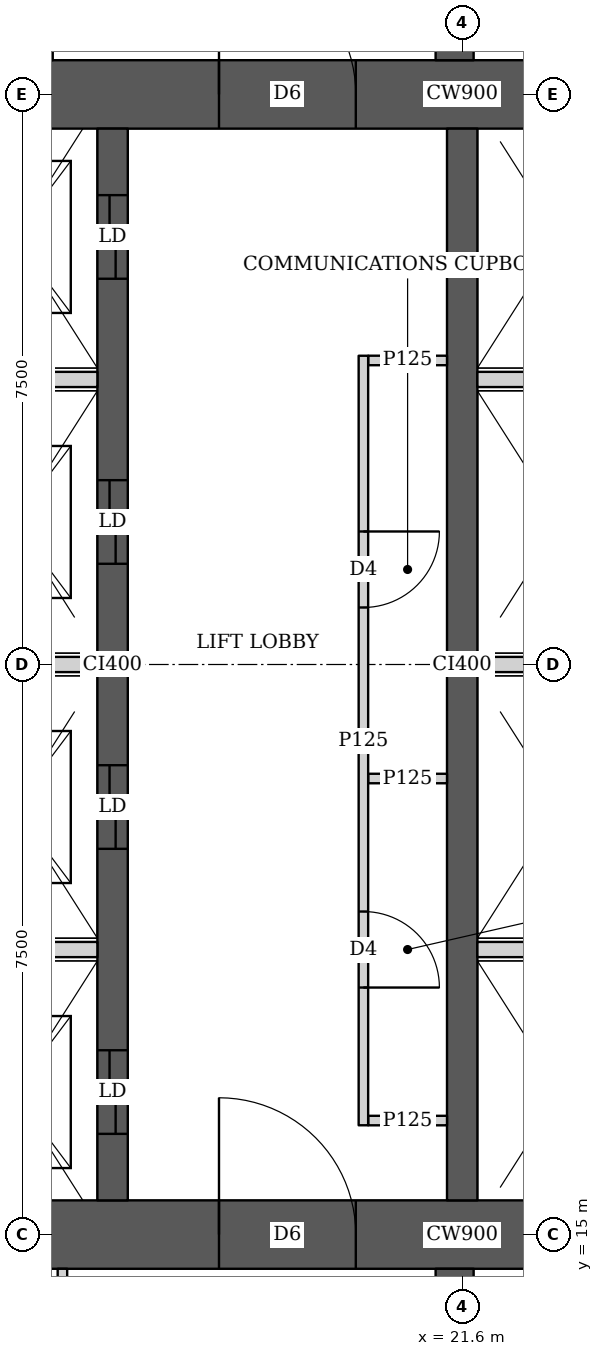
"""IFC4 building model, lengths in metres.
Left out: names, types, materials, properties, quantities, classifications, styles, units other than length and angle.
Written with IfcOpenShell. Run it as: python <this file> out.ifc"""

import sys

from ifc_helpers import new_model, si_unit, direction, frame, frame_2d, origin, place, context, subcontext, project, spatial, rectangle, extrude, element, fill, save


model = new_model("IFC4")
c1 = context("Model", 3, precision=1e-05, world=origin(), true_north=direction((0.0, 1.0)))
c2 = subcontext(c1, "Body", "Model", "MODEL_VIEW")
j1 = project(units=[si_unit("LENGTHUNIT", "METRE"), si_unit("PLANEANGLEUNIT", "RADIAN")], contexts=[c1])
p1 = place(None, origin())
s1 = spatial("IfcSite", under=j1, at=p1, CompositionType="ELEMENT")
p2 = place(p1, origin())
s2 = spatial("IfcBuilding", under=s1, at=p2, CompositionType="ELEMENT")
p3 = place(p2, frame((0.0, 0.0, 65.0)))
s3 = spatial("IfcBuildingStorey", under=s2, at=p3, CompositionType="ELEMENT", Elevation=65.0)
p4 = place(p3, frame((13.95, 15.0, 0.0), z_axis=(0.0, 0.0, 1.0), x_axis=(1.0, 0.0, 0.0)))
e1 = element("IfcWall", 1, at=p4, inside=s3, PredefinedType="SHEAR", context=c2, shape_type="SweptSolid", body=[
    extrude(rectangle(XDim=15.3, YDim=0.9, at=frame_2d((7.65, 0.0))), origin(), (0.0, 0.0, 1.0), 3.75),
])
p5 = place(p4, frame((4.45, 0.0, 0.0)))
e2 = element("IfcOpeningElement", 2, at=p5, cuts=e1, PredefinedType="OPENING", context=c2, shape_type="SweptSolid", body=[
    extrude(rectangle(XDim=1.8, YDim=2.1, at=frame_2d((0.9, 1.05))), frame((0.0, 0.46, 0.0), z_axis=(0.0, -1.0, 0.0), x_axis=(1.0, 0.0, 0.0)), (0.0, 0.0, 1.0), 0.92),
])
p6 = place(p4, frame((10.7, 0.0, 0.0)))
e3 = element("IfcOpeningElement", 3, at=p6, cuts=e1, PredefinedType="OPENING", context=c2, shape_type="SweptSolid", body=[
    extrude(rectangle(XDim=1.1, YDim=2.1, at=frame_2d((0.55, 1.05))), frame((0.0, 0.46, 0.0), z_axis=(0.0, -1.0, 0.0), x_axis=(1.0, 0.0, 0.0)), (0.0, 0.0, 1.0), 0.92),
])
p7 = place(p3, frame((13.95, 30.0, 0.0), z_axis=(0.0, 0.0, 1.0), x_axis=(1.0, 0.0, 0.0)))
e4 = element("IfcWall", 4, at=p7, inside=s3, PredefinedType="SHEAR", context=c2, shape_type="SweptSolid", body=[
    extrude(rectangle(XDim=15.3, YDim=0.9, at=frame_2d((7.65, 0.0))), origin(), (0.0, 0.0, 1.0), 3.75),
])
p8 = place(p7, frame((4.45, 0.0, 0.0)))
e5 = element("IfcOpeningElement", 5, at=p8, cuts=e4, PredefinedType="OPENING", context=c2, shape_type="SweptSolid", body=[
    extrude(rectangle(XDim=1.8, YDim=2.1, at=frame_2d((0.9, 1.05))), frame((0.0, 0.46, 0.0), z_axis=(0.0, -1.0, 0.0), x_axis=(1.0, 0.0, 0.0)), (0.0, 0.0, 1.0), 0.92),
])
p9 = place(p7, frame((10.7, 0.0, 0.0)))
e6 = element("IfcOpeningElement", 6, at=p9, cuts=e4, PredefinedType="OPENING", context=c2, shape_type="SweptSolid", body=[
    extrude(rectangle(XDim=1.1, YDim=2.1, at=frame_2d((0.55, 1.05))), frame((0.0, 0.46, 0.0), z_axis=(0.0, -1.0, 0.0), x_axis=(1.0, 0.0, 0.0)), (0.0, 0.0, 1.0), 0.92),
])
p10 = place(p3, frame((17.0, 15.45, 0.0), z_axis=(0.0, 0.0, 1.0), x_axis=(0.0, 1.0, 0.0)))
e7 = element("IfcWall", 7, at=p10, inside=s3, PredefinedType="SHEAR", context=c2, shape_type="SweptSolid", body=[
    extrude(rectangle(XDim=14.1, YDim=0.4, at=frame_2d((7.05, 0.0))), origin(), (0.0, 0.0, 1.0), 3.75),
])
p11 = place(p10, frame((0.875, 0.0, 0.0)))
e8 = element("IfcOpeningElement", 8, at=p11, cuts=e7, PredefinedType="OPENING", context=c2, shape_type="SweptSolid", body=[
    extrude(rectangle(XDim=1.1, YDim=2.1, at=frame_2d((0.55, 1.05))), frame((0.0, 0.21, 0.0), z_axis=(0.0, -1.0, 0.0), x_axis=(1.0, 0.0, 0.0)), (0.0, 0.0, 1.0), 0.42),
])
p12 = place(p10, frame((4.625, 0.0, 0.0)))
e9 = element("IfcOpeningElement", 9, at=p12, cuts=e7, PredefinedType="OPENING", context=c2, shape_type="SweptSolid", body=[
    extrude(rectangle(XDim=1.1, YDim=2.1, at=frame_2d((0.55, 1.05))), frame((0.0, 0.21, 0.0), z_axis=(0.0, -1.0, 0.0), x_axis=(1.0, 0.0, 0.0)), (0.0, 0.0, 1.0), 0.42),
])
p13 = place(p10, frame((8.375, 0.0, 0.0)))
e10 = element("IfcOpeningElement", 10, at=p13, cuts=e7, PredefinedType="OPENING", context=c2, shape_type="SweptSolid", body=[
    extrude(rectangle(XDim=1.1, YDim=2.1, at=frame_2d((0.55, 1.05))), frame((0.0, 0.21, 0.0), z_axis=(0.0, -1.0, 0.0), x_axis=(1.0, 0.0, 0.0)), (0.0, 0.0, 1.0), 0.42),
])
p14 = place(p10, frame((12.125, 0.0, 0.0)))
e11 = element("IfcOpeningElement", 11, at=p14, cuts=e7, PredefinedType="OPENING", context=c2, shape_type="SweptSolid", body=[
    extrude(rectangle(XDim=1.1, YDim=2.1, at=frame_2d((0.55, 1.05))), frame((0.0, 0.21, 0.0), z_axis=(0.0, -1.0, 0.0), x_axis=(1.0, 0.0, 0.0)), (0.0, 0.0, 1.0), 0.42),
])
p15 = place(p3, frame((21.6, 15.45, 0.0), z_axis=(0.0, 0.0, 1.0), x_axis=(0.0, 1.0, 0.0)))
e12 = element("IfcWall", 12, at=p15, inside=s3, PredefinedType="SHEAR", context=c2, shape_type="SweptSolid", body=[
    extrude(rectangle(XDim=14.1, YDim=0.4, at=frame_2d((7.05, 0.0))), origin(), (0.0, 0.0, 1.0), 3.75),
])
for number, where, z_axis, x_axis in (
    (13, (21.5, 10.35, 0.0), (0.0, 0.0, 1.0), (0.0, 1.0, 0.0)),
    (14, (21.5, 30.45, 0.0), (0.0, 0.0, 1.0), (0.0, 1.0, 0.0)),
):
    element("IfcWall", number, at=place(p3, frame(where, z_axis=z_axis, x_axis=x_axis)), inside=s3, PredefinedType="SHEAR", context=c2, shape_type="SweptSolid", body=[
        extrude(rectangle(XDim=4.2, YDim=0.5, at=frame_2d((2.1, 0.0))), origin(), (0.0, 0.0, 1.0), 3.75),
    ])
p16 = place(p3, frame((16.34, 10.413, 0.0), z_axis=(0.0, 0.0, 1.0), x_axis=(0.0, 1.0, 0.0)))
e15 = element("IfcWall", 15, at=p16, inside=s3, PredefinedType="PARTITIONING", context=c2, shape_type="SweptSolid", body=[
    extrude(rectangle(XDim=4.137, YDim=0.125, at=frame_2d((2.068, 0.0))), origin(), (0.0, 0.0, 1.0), 3.5),
])
p17 = place(p16, frame((1.512, 0.0, 0.0)))
e16 = element("IfcOpeningElement", 16, at=p17, cuts=e15, PredefinedType="OPENING", context=c2, shape_type="SweptSolid", body=[
    extrude(rectangle(XDim=1.0, YDim=2.1, at=frame_2d((0.5, 1.05))), frame((0.0, 0.073, 0.0), z_axis=(0.0, -1.0, 0.0), x_axis=(1.0, 0.0, 0.0)), (0.0, 0.0, 1.0), 0.145),
])
p18 = place(p3, frame((16.15, 30.45, 0.0), z_axis=(0.0, 0.0, 1.0), x_axis=(0.0, 1.0, 0.0)))
e17 = element("IfcWall", 17, at=p18, inside=s3, PredefinedType="PARTITIONING", context=c2, shape_type="SweptSolid", body=[
    extrude(rectangle(XDim=4.137, YDim=0.125, at=frame_2d((2.068, 0.0))), origin(), (0.0, 0.0, 1.0), 3.5),
])
p19 = place(p18, frame((1.625, 0.0, 0.0)))
e18 = element("IfcOpeningElement", 18, at=p19, cuts=e17, PredefinedType="OPENING", context=c2, shape_type="SweptSolid", body=[
    extrude(rectangle(XDim=1.0, YDim=2.1, at=frame_2d((0.5, 1.05))), frame((0.0, 0.073, 0.0), z_axis=(0.0, -1.0, 0.0), x_axis=(1.0, 0.0, 0.0)), (0.0, 0.0, 1.0), 0.145),
])
p20 = place(p3, frame((20.3, 16.438, 0.0), z_axis=(0.0, 0.0, 1.0), x_axis=(0.0, 1.0, 0.0)))
e19 = element("IfcWall", 19, at=p20, inside=s3, PredefinedType="PARTITIONING", context=c2, shape_type="SweptSolid", body=[
    extrude(rectangle(XDim=10.124, YDim=0.125, at=frame_2d((5.062, 0.0))), origin(), (0.0, 0.0, 1.0), 3.5),
])
p21 = place(p20, frame((1.812, 0.0, 0.0)))
e20 = element("IfcOpeningElement", 20, at=p21, cuts=e19, PredefinedType="OPENING", context=c2, shape_type="SweptSolid", body=[
    extrude(rectangle(XDim=1.0, YDim=2.1, at=frame_2d((0.5, 1.05))), frame((0.0, 0.073, 0.0), z_axis=(0.0, -1.0, 0.0), x_axis=(1.0, 0.0, 0.0)), (0.0, 0.0, 1.0), 0.145),
])
p22 = place(p20, frame((6.812, 0.0, 0.0)))
e21 = element("IfcOpeningElement", 21, at=p22, cuts=e19, PredefinedType="OPENING", context=c2, shape_type="SweptSolid", body=[
    extrude(rectangle(XDim=1.0, YDim=2.1, at=frame_2d((0.5, 1.05))), frame((0.0, 0.073, 0.0), z_axis=(0.0, -1.0, 0.0), x_axis=(1.0, 0.0, 0.0)), (0.0, 0.0, 1.0), 0.145),
])
for number, where, z_axis, x_axis in (
    (22, (20.363, 16.5, 0.0), (0.0, 0.0, 1.0), (1.0, 0.0, 0.0)),
    (23, (20.363, 26.5, 0.0), (0.0, 0.0, 1.0), (1.0, 0.0, 0.0)),
    (24, (20.363, 21.0, 0.0), (0.0, 0.0, 1.0), (1.0, 0.0, 0.0)),
):
    element("IfcWall", number, at=place(p3, frame(where, z_axis=z_axis, x_axis=x_axis)), inside=s3, PredefinedType="PARTITIONING", context=c2, shape_type="SweptSolid", body=[
        extrude(rectangle(XDim=1.037, YDim=0.125, at=frame_2d((0.519, 0.0))), origin(), (0.0, 0.0, 1.0), 3.5),
    ])
p23 = place(p3, frame((14.85, 18.75, 0.0), z_axis=(0.0, 0.0, 1.0), x_axis=(1.0, 0.0, 0.0)))
e25 = element("IfcWall", 25, at=p23, inside=s3, PredefinedType="SOLIDWALL", context=c2, shape_type="SweptSolid", body=[
    extrude(rectangle(XDim=1.95, YDim=0.2, at=frame_2d((0.975, 0.0))), origin(), (0.0, 0.0, 1.0), 3.5),
])
p24 = place(p3, frame((21.8, 18.75, 0.0), z_axis=(0.0, 0.0, 1.0), x_axis=(1.0, 0.0, 0.0)))
e26 = element("IfcWall", 26, at=p24, inside=s3, PredefinedType="SOLIDWALL", context=c2, shape_type="SweptSolid", body=[
    extrude(rectangle(XDim=2.2, YDim=0.2, at=frame_2d((1.1, 0.0))), origin(), (0.0, 0.0, 1.0), 3.5),
])
p25 = place(p3, frame((14.85, 22.5, 0.0), z_axis=(0.0, 0.0, 1.0), x_axis=(1.0, 0.0, 0.0)))
e27 = element("IfcWall", 27, at=p25, inside=s3, PredefinedType="SOLIDWALL", context=c2, shape_type="SweptSolid", body=[
    extrude(rectangle(XDim=1.95, YDim=0.2, at=frame_2d((0.975, 0.0))), origin(), (0.0, 0.0, 1.0), 3.5),
])
p26 = place(p3, frame((21.8, 22.5, 0.0), z_axis=(0.0, 0.0, 1.0), x_axis=(1.0, 0.0, 0.0)))
e28 = element("IfcWall", 28, at=p26, inside=s3, PredefinedType="SOLIDWALL", context=c2, shape_type="SweptSolid", body=[
    extrude(rectangle(XDim=2.2, YDim=0.2, at=frame_2d((1.1, 0.0))), origin(), (0.0, 0.0, 1.0), 3.5),
])
p27 = place(p3, frame((14.85, 26.25, 0.0), z_axis=(0.0, 0.0, 1.0), x_axis=(1.0, 0.0, 0.0)))
e29 = element("IfcWall", 29, at=p27, inside=s3, PredefinedType="SOLIDWALL", context=c2, shape_type="SweptSolid", body=[
    extrude(rectangle(XDim=1.95, YDim=0.2, at=frame_2d((0.975, 0.0))), origin(), (0.0, 0.0, 1.0), 3.5),
])
p28 = place(p3, frame((21.8, 26.25, 0.0), z_axis=(0.0, 0.0, 1.0), x_axis=(1.0, 0.0, 0.0)))
e30 = element("IfcWall", 30, at=p28, inside=s3, PredefinedType="SOLIDWALL", context=c2, shape_type="SweptSolid", body=[
    extrude(rectangle(XDim=2.2, YDim=0.2, at=frame_2d((1.1, 0.0))), origin(), (0.0, 0.0, 1.0), 3.5),
])
p29 = place(p21, origin())
e31 = element("IfcDoor", 31, at=p29, inside=s3, OperationType="SINGLE_SWING_RIGHT", PredefinedType="DOOR", context=c2, shape_type="SweptSolid", body=[
    extrude(rectangle(XDim=1.0, YDim=2.1, at=frame_2d((0.5, 1.05))), frame((0.0, 0.025, 0.0), z_axis=(0.0, -1.0, 0.0), x_axis=(1.0, 0.0, 0.0)), (0.0, 0.0, 1.0), 0.05),
])
fill(e20, e31)
p30 = place(p22, origin())
e32 = element("IfcDoor", 32, at=p30, inside=s3, OperationType="SINGLE_SWING_LEFT", PredefinedType="DOOR", context=c2, shape_type="SweptSolid", body=[
    extrude(rectangle(XDim=1.0, YDim=2.1, at=frame_2d((0.5, 1.05))), frame((0.0, 0.025, 0.0), z_axis=(0.0, -1.0, 0.0), x_axis=(1.0, 0.0, 0.0)), (0.0, 0.0, 1.0), 0.05),
])
fill(e21, e32)
p31 = place(p5, origin())
e33 = element("IfcDoor", 33, at=p31, inside=s3, OperationType="DOUBLE_DOOR_SINGLE_SWING", PredefinedType="DOOR", context=c2, shape_type="SweptSolid", body=[
    extrude(rectangle(XDim=1.8, YDim=2.1, at=frame_2d((0.9, 1.05))), frame((0.0, 0.025, 0.0), z_axis=(0.0, -1.0, 0.0), x_axis=(1.0, 0.0, 0.0)), (0.0, 0.0, 1.0), 0.05),
])
fill(e2, e33)
p32 = place(p8, origin())
e34 = element("IfcDoor", 34, at=p32, inside=s3, OperationType="DOUBLE_DOOR_SINGLE_SWING", PredefinedType="DOOR", context=c2, shape_type="SweptSolid", body=[
    extrude(rectangle(XDim=1.8, YDim=2.1, at=frame_2d((0.9, 1.05))), frame((0.0, 0.025, 0.0), z_axis=(0.0, -1.0, 0.0), x_axis=(1.0, 0.0, 0.0)), (0.0, 0.0, 1.0), 0.05),
])
fill(e5, e34)
p33 = place(p11, origin())
e35 = element("IfcDoor", 35, at=p33, inside=s3, OperationType="DOUBLE_DOOR_SLIDING", PredefinedType="DOOR", context=c2, shape_type="SweptSolid", body=[
    extrude(rectangle(XDim=1.1, YDim=2.1, at=frame_2d((0.55, 1.05))), frame((0.0, 0.025, 0.0), z_axis=(0.0, -1.0, 0.0), x_axis=(1.0, 0.0, 0.0)), (0.0, 0.0, 1.0), 0.05),
])
fill(e8, e35)
p34 = place(p12, origin())
e36 = element("IfcDoor", 36, at=p34, inside=s3, OperationType="DOUBLE_DOOR_SLIDING", PredefinedType="DOOR", context=c2, shape_type="SweptSolid", body=[
    extrude(rectangle(XDim=1.1, YDim=2.1, at=frame_2d((0.55, 1.05))), frame((0.0, 0.025, 0.0), z_axis=(0.0, -1.0, 0.0), x_axis=(1.0, 0.0, 0.0)), (0.0, 0.0, 1.0), 0.05),
])
fill(e9, e36)
p35 = place(p13, origin())
e37 = element("IfcDoor", 37, at=p35, inside=s3, OperationType="DOUBLE_DOOR_SLIDING", PredefinedType="DOOR", context=c2, shape_type="SweptSolid", body=[
    extrude(rectangle(XDim=1.1, YDim=2.1, at=frame_2d((0.55, 1.05))), frame((0.0, 0.025, 0.0), z_axis=(0.0, -1.0, 0.0), x_axis=(1.0, 0.0, 0.0)), (0.0, 0.0, 1.0), 0.05),
])
fill(e10, e37)
p36 = place(p14, origin())
e38 = element("IfcDoor", 38, at=p36, inside=s3, OperationType="DOUBLE_DOOR_SLIDING", PredefinedType="DOOR", context=c2, shape_type="SweptSolid", body=[
    extrude(rectangle(XDim=1.1, YDim=2.1, at=frame_2d((0.55, 1.05))), frame((0.0, 0.025, 0.0), z_axis=(0.0, -1.0, 0.0), x_axis=(1.0, 0.0, 0.0)), (0.0, 0.0, 1.0), 0.05),
])
fill(e11, e38)
save(model, sys.argv[1])
